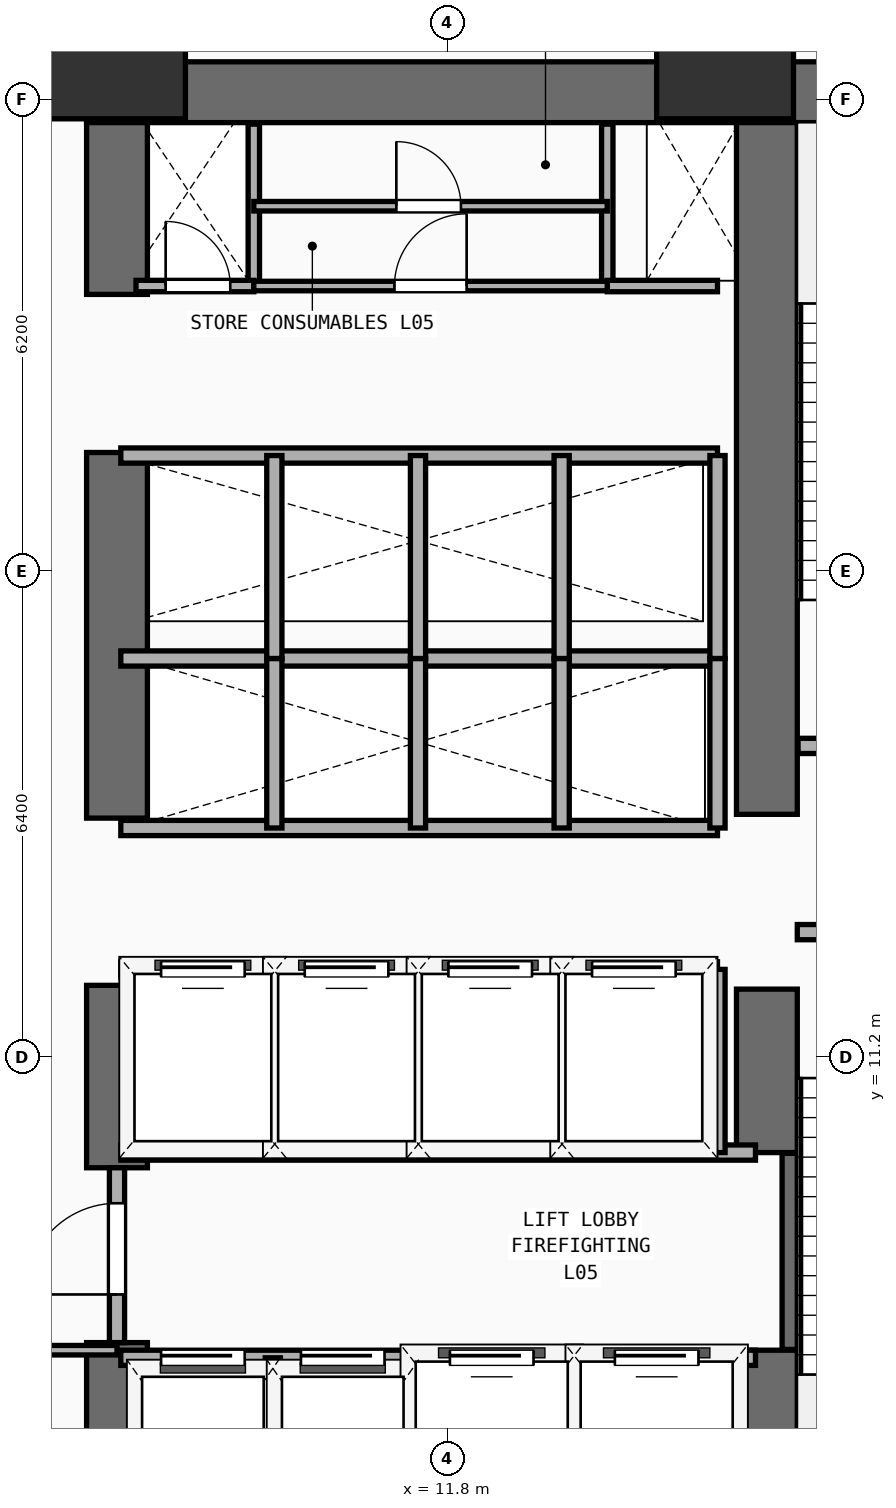
"""IFC4 building model, lengths in metres.
Left out: names, types, materials, properties, quantities, classifications, styles, units other than length and angle.
Written with IfcOpenShell. Run it as: python <this file> out.ifc"""

import sys

from ifc_helpers import new_model, si_unit, direction, frame, frame_2d, origin, origin_2d, place, context, subcontext, project, spatial, rectangle, extrude, element, fill, save


model = new_model("IFC4")
c1 = context("Model", 3, precision=1e-05, world=origin(), true_north=direction((0.0, 1.0)))
c2 = subcontext(c1, "Body", "Model", "MODEL_VIEW")
j1 = project(units=[si_unit("LENGTHUNIT", "METRE"), si_unit("PLANEANGLEUNIT", "RADIAN")], contexts=[c1])
p1 = place(None, origin())
s1 = spatial("IfcSite", under=j1, at=p1, CompositionType="ELEMENT")
p2 = place(p1, origin())
s2 = spatial("IfcBuilding", under=s1, at=p2, CompositionType="ELEMENT")
p3 = place(p2, frame((0.0, 0.0, 20.0)))
s3 = spatial("IfcBuildingStorey", under=s2, at=p3, CompositionType="ELEMENT", Elevation=20.0)
p4 = place(p3, frame((7.05, 23.9, 0.0), z_axis=(0.0, 0.0, 1.0), x_axis=(1.0, 0.0, 0.0)))
e1 = element("IfcWall", 1, at=p4, inside=s3, PredefinedType="SHEAR", context=c2, shape_type="SweptSolid", body=[
    extrude(rectangle(XDim=14.15, YDim=0.8, at=frame_2d((7.075, 0.0))), origin(), (0.0, 0.0, 1.0), 4.46),
])
p5 = place(p3, frame((7.45, 4.65, 0.0), z_axis=(0.0, 0.0, 1.0), x_axis=(0.0, 1.0, 0.0)))
e2 = element("IfcWall", 2, at=p5, inside=s3, PredefinedType="SHEAR", context=c2, shape_type="SweptSolid", body=[
    extrude(rectangle(XDim=2.8, YDim=0.8, at=frame_2d((1.4, 0.0))), origin(), (0.0, 0.0, 1.0), 4.46),
])
p6 = place(p3, frame((7.45, 9.75, 0.0), z_axis=(0.0, 0.0, 1.0), x_axis=(0.0, 1.0, 0.0)))
e3 = element("IfcWall", 3, at=p6, inside=s3, PredefinedType="SHEAR", context=c2, shape_type="SweptSolid", body=[
    extrude(rectangle(XDim=2.4, YDim=0.8, at=frame_2d((1.2, 0.0))), origin(), (0.0, 0.0, 1.0), 4.46),
])
p7 = place(p3, frame((7.45, 14.35, 0.0), z_axis=(0.0, 0.0, 1.0), x_axis=(0.0, 1.0, 0.0)))
e4 = element("IfcWall", 4, at=p7, inside=s3, PredefinedType="SHEAR", context=c2, shape_type="SweptSolid", body=[
    extrude(rectangle(XDim=4.81, YDim=0.8, at=frame_2d((2.405, 0.0))), origin(), (0.0, 0.0, 1.0), 4.46),
])
p8 = place(p3, frame((7.45, 21.24, 0.0), z_axis=(0.0, 0.0, 1.0), x_axis=(0.0, 1.0, 0.0)))
e5 = element("IfcWall", 5, at=p8, inside=s3, PredefinedType="SHEAR", context=c2, shape_type="SweptSolid", body=[
    extrude(rectangle(XDim=2.26, YDim=0.8, at=frame_2d((1.13, 0.0))), origin(), (0.0, 0.0, 1.0), 4.46),
])
p9 = place(p3, frame((16.0, 4.65, 0.0), z_axis=(0.0, 0.0, 1.0), x_axis=(0.0, 1.0, 0.0)))
e6 = element("IfcWall", 6, at=p9, inside=s3, PredefinedType="SHEAR", context=c2, shape_type="SweptSolid", body=[
    extrude(rectangle(XDim=2.7, YDim=0.8, at=frame_2d((1.35, 0.0))), origin(), (0.0, 0.0, 1.0), 4.46),
])
p10 = place(p3, frame((16.0, 9.95, 0.0), z_axis=(0.0, 0.0, 1.0), x_axis=(0.0, 1.0, 0.0)))
e7 = element("IfcWall", 7, at=p10, inside=s3, PredefinedType="SHEAR", context=c2, shape_type="SweptSolid", body=[
    extrude(rectangle(XDim=2.15, YDim=0.8, at=frame_2d((1.075, 0.0))), origin(), (0.0, 0.0, 1.0), 4.46),
])
p11 = place(p3, frame((16.0, 14.4, 0.0), z_axis=(0.0, 0.0, 1.0), x_axis=(0.0, 1.0, 0.0)))
e8 = element("IfcWall", 8, at=p11, inside=s3, PredefinedType="SHEAR", context=c2, shape_type="SweptSolid", body=[
    extrude(rectangle(XDim=9.1, YDim=0.8, at=frame_2d((4.55, 0.0))), origin(), (0.0, 0.0, 1.0), 4.46),
])
for number, where, z_axis, x_axis in (
    (9, (7.45, 24.45, 0.0), (0.0, 0.0, 1.0), (1.0, 0.0, 0.0)),
    (10, (15.45, 24.45, 0.0), (0.0, 0.0, 1.0), (1.0, 0.0, 0.0)),
):
    element("IfcColumn", number, at=place(p3, frame(where, z_axis=z_axis, x_axis=x_axis)), inside=s3, PredefinedType="COLUMN", context=c2, shape_type="SweptSolid", body=[
        extrude(rectangle(XDim=1.8, YDim=1.8, at=origin_2d()), origin(), (0.0, 0.0, 1.0), 4.46),
    ])
p12 = place(p3, frame((16.3, 7.36, 0.0), z_axis=(0.0, 0.0, 1.0), x_axis=(0.0, 1.0, 0.0)))
e11 = element("IfcWall", 11, at=p12, inside=s3, PredefinedType="SHEAR", context=c2, shape_type="SweptSolid", body=[
    extrude(rectangle(XDim=2.58, YDim=0.2, at=frame_2d((1.29, 0.0))), origin(), (0.0, 0.0, 1.0), 4.46),
])
p13 = place(p3, frame((16.4, 12.85, 0.0), z_axis=(0.0, 0.0, 1.0), x_axis=(1.0, 0.0, 0.0)))
e12 = element("IfcWall", 12, at=p13, inside=s3, PredefinedType="PARTITIONING", context=c2, shape_type="SweptSolid", body=[
    extrude(rectangle(XDim=3.96, YDim=0.2, at=frame_2d((1.98, 0.0))), origin(), (0.0, 0.0, 1.0), 4.46),
])
p14 = place(p13, frame((1.304, 0.0, 0.0)))
e13 = element("IfcOpeningElement", 13, at=p14, cuts=e12, PredefinedType="OPENING", context=c2, shape_type="SweptSolid", body=[
    extrude(rectangle(XDim=1.1, YDim=2.2, at=frame_2d((0.55, 1.1))), frame((0.0, 0.11, 0.0), z_axis=(0.0, -1.0, 0.0), x_axis=(1.0, 0.0, 0.0)), (0.0, 0.0, 1.0), 0.22),
])
p15 = place(p3, frame((16.41, 15.3, 0.0), z_axis=(0.0, 0.0, 1.0), x_axis=(1.0, 0.0, 0.0)))
e14 = element("IfcWall", 14, at=p15, inside=s3, PredefinedType="PARTITIONING", context=c2, shape_type="SweptSolid", body=[
    extrude(rectangle(XDim=3.95, YDim=0.2, at=frame_2d((1.975, 0.0))), origin(), (0.0, 0.0, 1.0), 4.46),
])
p16 = place(p15, frame((1.294, 0.0, 0.0)))
e15 = element("IfcOpeningElement", 15, at=p16, cuts=e14, PredefinedType="OPENING", context=c2, shape_type="SweptSolid", body=[
    extrude(rectangle(XDim=1.1, YDim=2.2, at=frame_2d((0.55, 1.1))), frame((0.0, 0.11, 0.0), z_axis=(0.0, -1.0, 0.0), x_axis=(1.0, 0.0, 0.0)), (0.0, 0.0, 1.0), 0.22),
])
p17 = place(p3, frame((7.5, 7.25, 0.0), z_axis=(0.0, 0.0, 1.0), x_axis=(1.0, 0.0, 0.0)))
e16 = element("IfcWall", 16, at=p17, inside=s3, PredefinedType="PARTITIONING", context=c2, shape_type="SweptSolid", body=[
    extrude(rectangle(XDim=8.35, YDim=0.2, at=frame_2d((4.175, 0.0))), origin(), (0.0, 0.0, 1.0), 4.46),
])
p18 = place(p17, frame((0.53, 0.0, 0.0)))
e17 = element("IfcOpeningElement", 17, at=p18, cuts=e16, PredefinedType="OPENING", context=c2, shape_type="SweptSolid", body=[
    extrude(rectangle(XDim=1.1, YDim=2.2, at=frame_2d((0.55, 1.1))), frame((0.0, 0.11, 0.0), z_axis=(0.0, -1.0, 0.0), x_axis=(1.0, 0.0, 0.0)), (0.0, 0.0, 1.0), 0.22),
])
p19 = place(p17, frame((2.37, 0.0, 0.0)))
e18 = element("IfcOpeningElement", 18, at=p19, cuts=e16, PredefinedType="OPENING", context=c2, shape_type="SweptSolid", body=[
    extrude(rectangle(XDim=1.1, YDim=2.2, at=frame_2d((0.55, 1.1))), frame((0.0, 0.11, 0.0), z_axis=(0.0, -1.0, 0.0), x_axis=(1.0, 0.0, 0.0)), (0.0, 0.0, 1.0), 0.22),
])
p20 = place(p17, frame((4.33, 0.0, 0.0)))
e19 = element("IfcOpeningElement", 19, at=p20, cuts=e16, PredefinedType="OPENING", context=c2, shape_type="SweptSolid", body=[
    extrude(rectangle(XDim=1.1, YDim=2.2, at=frame_2d((0.55, 1.1))), frame((0.0, 0.11, 0.0), z_axis=(0.0, -1.0, 0.0), x_axis=(1.0, 0.0, 0.0)), (0.0, 0.0, 1.0), 0.22),
])
p21 = place(p17, frame((6.5, 0.0, 0.0)))
e20 = element("IfcOpeningElement", 20, at=p21, cuts=e16, PredefinedType="OPENING", context=c2, shape_type="SweptSolid", body=[
    extrude(rectangle(XDim=1.1, YDim=2.2, at=frame_2d((0.55, 1.1))), frame((0.0, 0.11, 0.0), z_axis=(0.0, -1.0, 0.0), x_axis=(1.0, 0.0, 0.0)), (0.0, 0.0, 1.0), 0.22),
])
p22 = place(p3, frame((7.5, 9.95, 0.0), z_axis=(0.0, 0.0, 1.0), x_axis=(1.0, 0.0, 0.0)))
e21 = element("IfcWall", 21, at=p22, inside=s3, PredefinedType="PARTITIONING", context=c2, shape_type="SweptSolid", body=[
    extrude(rectangle(XDim=8.35, YDim=0.2, at=frame_2d((4.175, 0.0))), origin(), (0.0, 0.0, 1.0), 4.46),
])
for number, where, z_axis, x_axis in (
    (22, (9.5, 4.45, 0.0), (0.0, 0.0, 1.0), (0.0, 1.0, 0.0)),
    (23, (11.36, 4.45, 0.0), (0.0, 0.0, 1.0), (0.0, 1.0, 0.0)),
    (24, (13.46, 4.45, 0.0), (0.0, 0.0, 1.0), (0.0, 1.0, 0.0)),
):
    element("IfcWall", number, at=place(p3, frame(where, z_axis=z_axis, x_axis=x_axis)), inside=s3, PredefinedType="PARTITIONING", context=c2, shape_type="SweptSolid", body=[
        extrude(rectangle(XDim=2.8, YDim=0.2, at=frame_2d((1.4, 0.0))), origin(), (0.0, 0.0, 1.0), 4.46),
    ])
p23 = place(p3, frame((7.45, 7.45, 0.0), z_axis=(0.0, 0.0, 1.0), x_axis=(0.0, 1.0, 0.0)))
e25 = element("IfcWall", 25, at=p23, inside=s3, PredefinedType="PARTITIONING", context=c2, shape_type="SweptSolid", body=[
    extrude(rectangle(XDim=2.3, YDim=0.2, at=frame_2d((1.15, 0.0))), origin(), (0.0, 0.0, 1.0), 3.24),
])
p24 = place(p23, frame((0.633, 0.0, 0.0)))
e26 = element("IfcOpeningElement", 26, at=p24, cuts=e25, PredefinedType="OPENING", context=c2, shape_type="SweptSolid", body=[
    extrude(rectangle(XDim=1.2, YDim=2.25, at=frame_2d((0.6, 1.125))), frame((0.0, 0.11, 0.0), z_axis=(0.0, -1.0, 0.0), x_axis=(1.0, 0.0, 0.0)), (0.0, 0.0, 1.0), 0.22),
])
p25 = place(p3, frame((7.5, 12.36, 0.0), z_axis=(0.0, 0.0, 1.0), x_axis=(1.0, 0.0, 0.0)))
e27 = element("IfcWall", 27, at=p25, inside=s3, PredefinedType="PARTITIONING", context=c2, shape_type="SweptSolid", body=[
    extrude(rectangle(XDim=7.85, YDim=0.2, at=frame_2d((3.925, 0.0))), origin(), (0.0, 0.0, 1.0), 4.46),
])
p26 = place(p25, frame((0.53, 0.0, 0.0)))
e28 = element("IfcOpeningElement", 28, at=p26, cuts=e27, PredefinedType="OPENING", context=c2, shape_type="SweptSolid", body=[
    extrude(rectangle(XDim=1.1, YDim=2.2, at=frame_2d((0.55, 1.1))), frame((0.0, 0.11, 0.0), z_axis=(0.0, -1.0, 0.0), x_axis=(1.0, 0.0, 0.0)), (0.0, 0.0, 1.0), 0.22),
])
p27 = place(p25, frame((2.42, 0.0, 0.0)))
e29 = element("IfcOpeningElement", 29, at=p27, cuts=e27, PredefinedType="OPENING", context=c2, shape_type="SweptSolid", body=[
    extrude(rectangle(XDim=1.1, YDim=2.2, at=frame_2d((0.55, 1.1))), frame((0.0, 0.11, 0.0), z_axis=(0.0, -1.0, 0.0), x_axis=(1.0, 0.0, 0.0)), (0.0, 0.0, 1.0), 0.22),
])
p28 = place(p25, frame((4.31, 0.0, 0.0)))
e30 = element("IfcOpeningElement", 30, at=p28, cuts=e27, PredefinedType="OPENING", context=c2, shape_type="SweptSolid", body=[
    extrude(rectangle(XDim=1.1, YDim=2.2, at=frame_2d((0.55, 1.1))), frame((0.0, 0.11, 0.0), z_axis=(0.0, -1.0, 0.0), x_axis=(1.0, 0.0, 0.0)), (0.0, 0.0, 1.0), 0.22),
])
p29 = place(p25, frame((6.2, 0.0, 0.0)))
e31 = element("IfcOpeningElement", 31, at=p29, cuts=e27, PredefinedType="OPENING", context=c2, shape_type="SweptSolid", body=[
    extrude(rectangle(XDim=1.1, YDim=2.2, at=frame_2d((0.55, 1.1))), frame((0.0, 0.11, 0.0), z_axis=(0.0, -1.0, 0.0), x_axis=(1.0, 0.0, 0.0)), (0.0, 0.0, 1.0), 0.22),
])
for number, where, z_axis, x_axis in (
    (32, (15.35, 9.95, 0.0), (0.0, 0.0, 1.0), (0.0, 1.0, 0.0)),
    (33, (9.52, 9.95, 0.0), (0.0, 0.0, 1.0), (0.0, 1.0, 0.0)),
    (34, (11.41, 9.95, 0.0), (0.0, 0.0, 1.0), (0.0, 1.0, 0.0)),
    (35, (13.3, 9.95, 0.0), (0.0, 0.0, 1.0), (0.0, 1.0, 0.0)),
):
    element("IfcWall", number, at=place(p3, frame(where, z_axis=z_axis, x_axis=x_axis)), inside=s3, PredefinedType="PARTITIONING", context=c2, shape_type="SweptSolid", body=[
        extrude(rectangle(XDim=2.41, YDim=0.2, at=frame_2d((1.205, 0.0))), origin(), (0.0, 0.0, 1.0), 4.46),
    ])
for number, where, z_axis, x_axis in (
    (36, (7.5, 14.22, 0.0), (0.0, 0.0, 1.0), (1.0, 0.0, 0.0)),
    (37, (7.5, 16.45, 0.0), (0.0, 0.0, 1.0), (1.0, 0.0, 0.0)),
):
    element("IfcWall", number, at=place(p3, frame(where, z_axis=z_axis, x_axis=x_axis)), inside=s3, PredefinedType="PARTITIONING", context=c2, shape_type="SweptSolid", body=[
        extrude(rectangle(XDim=7.85, YDim=0.2, at=frame_2d((3.925, 0.0))), origin(), (0.0, 0.0, 1.0), 4.46),
    ])
for number, where, z_axis, x_axis in (
    (38, (15.35, 14.22, 0.0), (0.0, 0.0, 1.0), (0.0, 1.0, 0.0)),
    (39, (9.52, 14.22, 0.0), (0.0, 0.0, 1.0), (0.0, 1.0, 0.0)),
    (40, (11.41, 14.22, 0.0), (0.0, 0.0, 1.0), (0.0, 1.0, 0.0)),
    (41, (13.3, 14.22, 0.0), (0.0, 0.0, 1.0), (0.0, 1.0, 0.0)),
):
    element("IfcWall", number, at=place(p3, frame(where, z_axis=z_axis, x_axis=x_axis)), inside=s3, PredefinedType="PARTITIONING", context=c2, shape_type="SweptSolid", body=[
        extrude(rectangle(XDim=2.23, YDim=0.2, at=frame_2d((1.115, 0.0))), origin(), (0.0, 0.0, 1.0), 4.46),
    ])
p30 = place(p3, frame((7.5, 19.12, 0.0), z_axis=(0.0, 0.0, 1.0), x_axis=(1.0, 0.0, 0.0)))
e42 = element("IfcWall", 42, at=p30, inside=s3, PredefinedType="PARTITIONING", context=c2, shape_type="SweptSolid", body=[
    extrude(rectangle(XDim=7.85, YDim=0.2, at=frame_2d((3.925, 0.0))), origin(), (0.0, 0.0, 1.0), 4.46),
])
for number, where, z_axis, x_axis in (
    (43, (15.35, 16.45, 0.0), (0.0, 0.0, 1.0), (0.0, 1.0, 0.0)),
    (44, (9.52, 16.45, 0.0), (0.0, 0.0, 1.0), (0.0, 1.0, 0.0)),
    (45, (11.41, 16.45, 0.0), (0.0, 0.0, 1.0), (0.0, 1.0, 0.0)),
    (46, (13.3, 16.45, 0.0), (0.0, 0.0, 1.0), (0.0, 1.0, 0.0)),
):
    element("IfcWall", number, at=place(p3, frame(where, z_axis=z_axis, x_axis=x_axis)), inside=s3, PredefinedType="PARTITIONING", context=c2, shape_type="SweptSolid", body=[
        extrude(rectangle(XDim=2.67, YDim=0.2, at=frame_2d((1.335, 0.0))), origin(), (0.0, 0.0, 1.0), 4.46),
    ])
for number, where, z_axis, x_axis in (
    (47, (9.25, 21.35, 0.0), (0.0, 0.0, 1.0), (0.0, 1.0, 0.0)),
    (48, (13.9, 21.35, 0.0), (0.0, 0.0, 1.0), (0.0, 1.0, 0.0)),
):
    element("IfcWall", number, at=place(p3, frame(where, z_axis=z_axis, x_axis=x_axis)), inside=s3, PredefinedType="PARTITIONING", context=c2, shape_type="SweptSolid", body=[
        extrude(rectangle(XDim=2.13, YDim=0.15, at=frame_2d((1.065, 0.0))), origin(), (0.0, 0.0, 1.0), 4.46),
    ])
p31 = place(p3, frame((7.7, 21.35, 0.0), z_axis=(0.0, 0.0, 1.0), x_axis=(1.0, 0.0, 0.0)))
e49 = element("IfcWall", 49, at=p31, inside=s3, PredefinedType="PARTITIONING", context=c2, shape_type="SweptSolid", body=[
    extrude(rectangle(XDim=1.55, YDim=0.15, at=frame_2d((0.775, 0.0))), origin(), (0.0, 0.0, 1.0), 4.46),
])
p32 = place(p31, frame((0.39, 0.0, 0.0)))
e50 = element("IfcOpeningElement", 50, at=p32, cuts=e49, PredefinedType="OPENING", context=c2, shape_type="SweptSolid", body=[
    extrude(rectangle(XDim=0.85, YDim=2.15, at=frame_2d((0.425, 1.075))), frame((0.0, 0.085, 0.0), z_axis=(0.0, -1.0, 0.0), x_axis=(1.0, 0.0, 0.0)), (0.0, 0.0, 1.0), 0.17),
])
p33 = place(p3, frame((13.9, 21.35, 0.0), z_axis=(0.0, 0.0, 1.0), x_axis=(1.0, 0.0, 0.0)))
e51 = element("IfcWall", 51, at=p33, inside=s3, PredefinedType="PARTITIONING", context=c2, shape_type="SweptSolid", body=[
    extrude(rectangle(XDim=1.45, YDim=0.15, at=frame_2d((0.725, 0.0))), origin(), (0.0, 0.0, 1.0), 4.46),
])
p34 = place(p3, frame((9.25, 21.35, 0.0), z_axis=(0.0, 0.0, 1.0), x_axis=(1.0, 0.0, 0.0)))
e52 = element("IfcWall", 52, at=p34, inside=s3, PredefinedType="PARTITIONING", context=c2, shape_type="SweptSolid", body=[
    extrude(rectangle(XDim=4.65, YDim=0.125, at=frame_2d((2.325, 0.0))), origin(), (0.0, 0.0, 1.0), 4.46),
])
p35 = place(p34, frame((1.85, 0.0, 0.0)))
e53 = element("IfcOpeningElement", 53, at=p35, cuts=e52, PredefinedType="OPENING", context=c2, shape_type="SweptSolid", body=[
    extrude(rectangle(XDim=0.95, YDim=2.15, at=frame_2d((0.475, 1.075))), frame((0.0, 0.073, 0.0), z_axis=(0.0, -1.0, 0.0), x_axis=(1.0, 0.0, 0.0)), (0.0, 0.0, 1.0), 0.145),
])
p36 = place(p3, frame((9.25, 22.4, 0.0), z_axis=(0.0, 0.0, 1.0), x_axis=(1.0, 0.0, 0.0)))
e54 = element("IfcWall", 54, at=p36, inside=s3, PredefinedType="PARTITIONING", context=c2, shape_type="SweptSolid", body=[
    extrude(rectangle(XDim=4.65, YDim=0.125, at=frame_2d((2.325, 0.0))), origin(), (0.0, 0.0, 1.0), 4.46),
])
p37 = place(p36, frame((1.875, 0.0, 0.0)))
e55 = element("IfcOpeningElement", 55, at=p37, cuts=e54, PredefinedType="OPENING", context=c2, shape_type="SweptSolid", body=[
    extrude(rectangle(XDim=0.85, YDim=2.15, at=frame_2d((0.425, 1.075))), frame((0.0, 0.073, 0.0), z_axis=(0.0, -1.0, 0.0), x_axis=(1.0, 0.0, 0.0)), (0.0, 0.0, 1.0), 0.145),
])
p38 = place(p3, frame((0.42, 7.35, 0.0), z_axis=(0.0, 0.0, 1.0), x_axis=(1.0, 0.0, 0.0)))
e56 = element("IfcWall", 56, at=p38, inside=s3, PredefinedType="PARTITIONING", context=c2, shape_type="SweptSolid", body=[
    extrude(rectangle(XDim=7.03, YDim=0.125, at=frame_2d((3.515, 0.0))), origin(), (0.0, 0.0, 1.0), 4.46),
])
p39 = place(p38, frame((4.78, 0.0, 0.0)))
e57 = element("IfcOpeningElement", 57, at=p39, cuts=e56, PredefinedType="OPENING", context=c2, shape_type="SweptSolid", body=[
    extrude(rectangle(XDim=0.95, YDim=2.15, at=frame_2d((0.475, 1.075))), frame((0.0, 0.073, 0.0), z_axis=(0.0, -1.0, 0.0), x_axis=(1.0, 0.0, 0.0)), (0.0, 0.0, 1.0), 0.145),
])
p40 = place(p18, origin())
e58 = element("IfcDoor", 58, at=p40, inside=s3, OperationType="SLIDING_TO_LEFT", PredefinedType="DOOR", context=c2, shape_type="SweptSolid", body=[
    extrude(rectangle(XDim=1.1, YDim=2.2, at=frame_2d((0.55, 1.1))), frame((0.0, 0.025, 0.0), z_axis=(0.0, -1.0, 0.0), x_axis=(1.0, 0.0, 0.0)), (0.0, 0.0, 1.0), 0.05),
])
fill(e17, e58)
p41 = place(p19, origin())
e59 = element("IfcDoor", 59, at=p41, inside=s3, OperationType="SLIDING_TO_LEFT", PredefinedType="DOOR", context=c2, shape_type="SweptSolid", body=[
    extrude(rectangle(XDim=1.1, YDim=2.2, at=frame_2d((0.55, 1.1))), frame((0.0, 0.025, 0.0), z_axis=(0.0, -1.0, 0.0), x_axis=(1.0, 0.0, 0.0)), (0.0, 0.0, 1.0), 0.05),
])
fill(e18, e59)
p42 = place(p20, origin())
e60 = element("IfcDoor", 60, at=p42, inside=s3, OperationType="SLIDING_TO_LEFT", PredefinedType="DOOR", context=c2, shape_type="SweptSolid", body=[
    extrude(rectangle(XDim=1.1, YDim=2.2, at=frame_2d((0.55, 1.1))), frame((0.0, 0.025, 0.0), z_axis=(0.0, -1.0, 0.0), x_axis=(1.0, 0.0, 0.0)), (0.0, 0.0, 1.0), 0.05),
])
fill(e19, e60)
p43 = place(p21, origin())
e61 = element("IfcDoor", 61, at=p43, inside=s3, OperationType="SLIDING_TO_LEFT", PredefinedType="DOOR", context=c2, shape_type="SweptSolid", body=[
    extrude(rectangle(XDim=1.1, YDim=2.2, at=frame_2d((0.55, 1.1))), frame((0.0, 0.025, 0.0), z_axis=(0.0, -1.0, 0.0), x_axis=(1.0, 0.0, 0.0)), (0.0, 0.0, 1.0), 0.05),
])
fill(e20, e61)
p44 = place(p24, frame((1.2, 0.0, 0.0), z_axis=(0.0, 0.0, 1.0), x_axis=(-1.0, 0.0, 0.0)))
e62 = element("IfcDoor", 62, at=p44, inside=s3, OperationType="SINGLE_SWING_RIGHT", PredefinedType="DOOR", context=c2, shape_type="SweptSolid", body=[
    extrude(rectangle(XDim=1.2, YDim=2.25, at=frame_2d((0.6, 1.125))), frame((0.0, 0.025, 0.0), z_axis=(0.0, -1.0, 0.0), x_axis=(1.0, 0.0, 0.0)), (0.0, 0.0, 1.0), 0.05),
])
fill(e26, e62)
p45 = place(p26, origin())
e63 = element("IfcDoor", 63, at=p45, inside=s3, OperationType="SLIDING_TO_LEFT", PredefinedType="DOOR", context=c2, shape_type="SweptSolid", body=[
    extrude(rectangle(XDim=1.1, YDim=2.2, at=frame_2d((0.55, 1.1))), frame((0.0, 0.025, 0.0), z_axis=(0.0, -1.0, 0.0), x_axis=(1.0, 0.0, 0.0)), (0.0, 0.0, 1.0), 0.05),
])
fill(e28, e63)
p46 = place(p27, origin())
e64 = element("IfcDoor", 64, at=p46, inside=s3, OperationType="SLIDING_TO_LEFT", PredefinedType="DOOR", context=c2, shape_type="SweptSolid", body=[
    extrude(rectangle(XDim=1.1, YDim=2.2, at=frame_2d((0.55, 1.1))), frame((0.0, 0.025, 0.0), z_axis=(0.0, -1.0, 0.0), x_axis=(1.0, 0.0, 0.0)), (0.0, 0.0, 1.0), 0.05),
])
fill(e29, e64)
p47 = place(p28, origin())
e65 = element("IfcDoor", 65, at=p47, inside=s3, OperationType="SLIDING_TO_LEFT", PredefinedType="DOOR", context=c2, shape_type="SweptSolid", body=[
    extrude(rectangle(XDim=1.1, YDim=2.2, at=frame_2d((0.55, 1.1))), frame((0.0, 0.025, 0.0), z_axis=(0.0, -1.0, 0.0), x_axis=(1.0, 0.0, 0.0)), (0.0, 0.0, 1.0), 0.05),
])
fill(e30, e65)
p48 = place(p29, origin())
e66 = element("IfcDoor", 66, at=p48, inside=s3, OperationType="SLIDING_TO_LEFT", PredefinedType="DOOR", context=c2, shape_type="SweptSolid", body=[
    extrude(rectangle(XDim=1.1, YDim=2.2, at=frame_2d((0.55, 1.1))), frame((0.0, 0.025, 0.0), z_axis=(0.0, -1.0, 0.0), x_axis=(1.0, 0.0, 0.0)), (0.0, 0.0, 1.0), 0.05),
])
fill(e31, e66)
p49 = place(p32, origin())
e67 = element("IfcDoor", 67, at=p49, inside=s3, OperationType="SINGLE_SWING_LEFT", PredefinedType="DOOR", context=c2, shape_type="SweptSolid", body=[
    extrude(rectangle(XDim=0.85, YDim=2.15, at=frame_2d((0.425, 1.075))), frame((0.0, 0.025, 0.0), z_axis=(0.0, -1.0, 0.0), x_axis=(1.0, 0.0, 0.0)), (0.0, 0.0, 1.0), 0.05),
])
fill(e50, e67)
p50 = place(p35, origin())
e68 = element("IfcDoor", 68, at=p50, inside=s3, OperationType="SINGLE_SWING_RIGHT", PredefinedType="DOOR", context=c2, shape_type="SweptSolid", body=[
    extrude(rectangle(XDim=0.95, YDim=2.15, at=frame_2d((0.475, 1.075))), frame((0.0, 0.025, 0.0), z_axis=(0.0, -1.0, 0.0), x_axis=(1.0, 0.0, 0.0)), (0.0, 0.0, 1.0), 0.05),
])
fill(e53, e68)
p51 = place(p37, origin())
e69 = element("IfcDoor", 69, at=p51, inside=s3, OperationType="SINGLE_SWING_LEFT", PredefinedType="DOOR", context=c2, shape_type="SweptSolid", body=[
    extrude(rectangle(XDim=0.85, YDim=2.15, at=frame_2d((0.425, 1.075))), frame((0.0, 0.025, 0.0), z_axis=(0.0, -1.0, 0.0), x_axis=(1.0, 0.0, 0.0)), (0.0, 0.0, 1.0), 0.05),
])
fill(e55, e69)
save(model, sys.argv[1])
